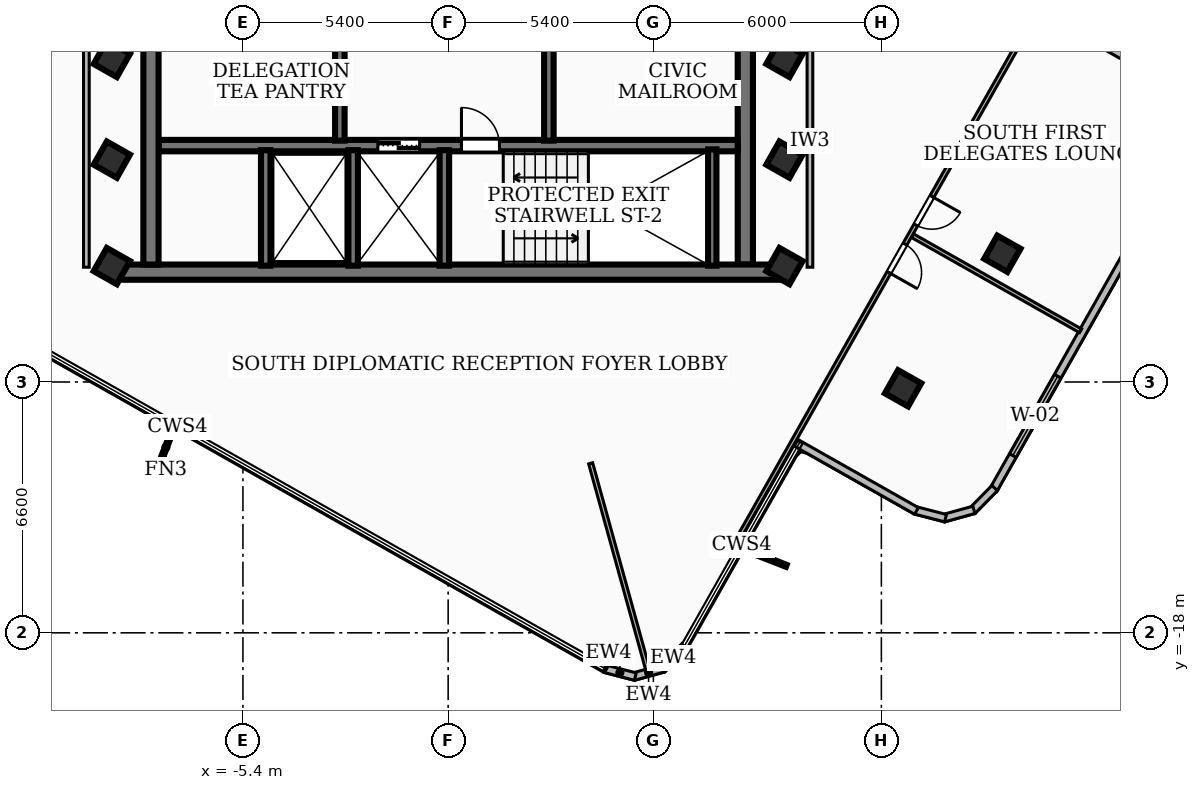
"""IFC4 building model, lengths in metres.
Left out: names, types, materials, properties, quantities, classifications, styles, units other than length and angle.
Written with IfcOpenShell. Run it as: python <this file> out.ifc"""

import sys

from ifc_helpers import new_model, si_unit, direction, frame, frame_2d, origin, origin_2d, place, context, subcontext, project, spatial, rectangle, extrude, element, fill, save


model = new_model("IFC4")
c1 = context("Model", 3, precision=1e-05, world=origin(), true_north=direction((0.0, 1.0)))
c2 = subcontext(c1, "Body", "Model", "MODEL_VIEW")
j1 = project(units=[si_unit("LENGTHUNIT", "METRE"), si_unit("PLANEANGLEUNIT", "RADIAN")], contexts=[c1])
p1 = place(None, origin())
s1 = spatial("IfcSite", under=j1, at=p1, CompositionType="ELEMENT")
p2 = place(p1, origin())
s2 = spatial("IfcBuilding", under=s1, at=p2, CompositionType="ELEMENT")
p3 = place(p2, frame((0.0, 0.0, 278.28)))
s3 = spatial("IfcBuildingStorey", under=s2, at=p3, CompositionType="ELEMENT", Elevation=278.28)
p4 = place(p3, frame((8.78, -8.51, 0.0), z_axis=(0.0, 0.0, 1.0), x_axis=(-1.0, 0.0, 0.0)))
e1 = element("IfcWall", 1, at=p4, inside=s3, PredefinedType="SHEAR", context=c2, shape_type="SweptSolid", body=[
    extrude(rectangle(XDim=17.56, YDim=0.4, at=frame_2d((8.78, 0.0))), origin(), (0.0, 0.0, 1.0), 3.16),
])
for number, where, z_axis, x_axis in (
    (2, (-7.82, -8.31, 0.0), (0.0, 0.0, 1.0), (0.0, 1.0, 0.0)),
    (3, (7.82, -1.95, 0.0), (0.0, 0.0, 1.0), (0.0, -1.0, 0.0)),
):
    element("IfcWall", number, at=place(p3, frame(where, z_axis=z_axis, x_axis=x_axis)), inside=s3, PredefinedType="SHEAR", context=c2, shape_type="SweptSolid", body=[
        extrude(rectangle(XDim=6.36, YDim=0.4, at=frame_2d((3.18, 0.0))), origin(), (0.0, 0.0, 1.0), 3.16),
    ])
p5 = place(p3, frame((-7.62, -5.18, 0.0), z_axis=(0.0, 0.0, 1.0), x_axis=(1.0, 0.0, 0.0)))
e4 = element("IfcWall", 4, at=p5, inside=s3, PredefinedType="SOLIDWALL", context=c2, shape_type="SweptSolid", body=[
    extrude(rectangle(XDim=15.24, YDim=0.3, at=frame_2d((7.62, 0.0))), origin(), (0.0, 0.0, 1.0), 3.16),
])
p6 = place(p5, frame((5.77, 0.0, 0.0)))
e5 = element("IfcOpeningElement", 5, at=p6, cuts=e4, PredefinedType="OPENING", context=c2, shape_type="SweptSolid", body=[
    extrude(rectangle(XDim=1.1, YDim=2.15, at=frame_2d((0.55, 1.075))), frame((0.0, 0.16, 0.0), z_axis=(0.0, -1.0, 0.0), x_axis=(1.0, 0.0, 0.0)), (0.0, 0.0, 1.0), 0.32),
])
p7 = place(p5, frame((7.97, 0.0, 0.0)))
e6 = element("IfcOpeningElement", 6, at=p7, cuts=e4, PredefinedType="OPENING", context=c2, shape_type="SweptSolid", body=[
    extrude(rectangle(XDim=1.0, YDim=2.1, at=frame_2d((0.5, 1.05))), frame((0.0, 0.16, 0.0), z_axis=(0.0, -1.0, 0.0), x_axis=(1.0, 0.0, 0.0)), (0.0, 0.0, 1.0), 0.32),
])
p8 = place(p3, frame((6.95, -8.34, 0.0), z_axis=(0.0, 0.0, 1.0), x_axis=(0.0, 1.0, 0.0)))
e7 = element("IfcWall", 7, at=p8, inside=s3, PredefinedType="SOLIDWALL", context=c2, shape_type="SweptSolid", body=[
    extrude(rectangle(XDim=3.06, YDim=0.22, at=frame_2d((1.53, 0.0))), origin(), (0.0, 0.0, 1.0), 3.16),
])
for number, where, z_axis, x_axis in (
    (8, (-0.1, -8.34, 0.0), (0.0, 0.0, 1.0), (0.0, 1.0, 0.0)),
    (9, (-2.5, -8.34, 0.0), (0.0, 0.0, 1.0), (0.0, 1.0, 0.0)),
    (10, (-4.8, -8.34, 0.0), (0.0, 0.0, 1.0), (0.0, 1.0, 0.0)),
):
    element("IfcWall", number, at=place(p3, frame(where, z_axis=z_axis, x_axis=x_axis)), inside=s3, PredefinedType="SOLIDWALL", context=c2, shape_type="SweptSolid", body=[
        extrude(rectangle(XDim=3.04, YDim=0.25, at=frame_2d((1.52, 0.0))), origin(), (0.0, 0.0, 1.0), 3.16),
    ])
for number, where, z_axis, x_axis in (
    (11, (-2.85, -5.05, 0.0), (0.0, 0.0, 1.0), (0.0, 1.0, 0.0)),
    (12, (2.65, -5.05, 0.0), (0.0, 0.0, 1.0), (0.0, 1.0, 0.0)),
):
    element("IfcWall", number, at=place(p3, frame(where, z_axis=z_axis, x_axis=x_axis)), inside=s3, PredefinedType="SOLIDWALL", context=c2, shape_type="SweptSolid", body=[
        extrude(rectangle(XDim=3.07, YDim=0.25, at=frame_2d((1.535, 0.0))), origin(), (0.0, 0.0, 1.0), 3.16),
    ])
for number, where, z_axis, x_axis in (
    (13, (-8.85, -5.55, 0.0), (0.0, 0.0, 1.0), (0.493, 0.87, 0.0)),
    (14, (-8.85, -2.9, 0.0), (0.0, 0.0, 1.0), (0.493, 0.87, 0.0)),
    (15, (8.85, -5.55, 0.0), (0.0, 0.0, 1.0), (0.493, 0.87, 0.0)),
    (16, (8.85, -2.9, 0.0), (0.0, 0.0, 1.0), (0.493, 0.87, 0.0)),
    (17, (8.85, -8.35, 0.0), (0.0, 0.0, 1.0), (0.493, 0.87, 0.0)),
    (18, (-8.85, -8.35, 0.0), (0.0, 0.0, 1.0), (0.493, 0.87, 0.0)),
    (19, (11.971, -11.566, 0.0), (0.0, 0.0, 1.0), (0.493, 0.87, 0.0)),
    (20, (14.583, -8.026, 0.0), (0.0, 0.0, 1.0), (0.493, 0.87, 0.0)),
):
    element("IfcColumn", number, at=place(p3, frame(where, z_axis=z_axis, x_axis=x_axis)), inside=s3, PredefinedType="COLUMN", context=c2, shape_type="SweptSolid", body=[
        extrude(rectangle(XDim=0.7, YDim=0.7, at=origin_2d()), origin(), (0.0, 0.0, 1.0), 3.42),
    ])
p9 = place(p3, frame((6.218, -18.359, 0.0), z_axis=(0.0, 0.0, 1.0), x_axis=(-0.701706468749, -0.712466161804, 0.0)))
e21 = element("IfcWall", 21, at=p9, inside=s3, PredefinedType="SOLIDWALL", context=c2, shape_type="SweptSolid", body=[
    extrude(rectangle(XDim=0.84, YDim=0.2, at=frame_2d((0.42, 0.0))), origin(), (0.0, 0.0, 1.0), 3.16),
])
p10 = place(p3, frame((5.671, -18.932, 0.0), z_axis=(0.0, 0.0, 1.0), x_axis=(-0.963313924885, -0.268377126675, 0.0)))
e22 = element("IfcWall", 22, at=p10, inside=s3, PredefinedType="SOLIDWALL", context=c2, shape_type="SweptSolid", body=[
    extrude(rectangle(XDim=0.824, YDim=0.2, at=frame_2d((0.412, 0.0))), origin(), (0.0, 0.0, 1.0), 3.16),
])
p11 = place(p3, frame((4.925, -19.152, 0.0), z_axis=(0.0, 0.0, 1.0), x_axis=(-0.968015248239, 0.250891369276, 0.0)))
e23 = element("IfcWall", 23, at=p11, inside=s3, PredefinedType="SOLIDWALL", context=c2, shape_type="SweptSolid", body=[
    extrude(rectangle(XDim=0.838, YDim=0.2, at=frame_2d((0.419, 0.0))), origin(), (0.0, 0.0, 1.0), 3.16),
])
p12 = place(p3, frame((15.609, -1.599, 0.0), z_axis=(0.0, 0.0, 1.0), x_axis=(0.87036421417, -0.49240850388, 0.0)))
e24 = element("IfcWall", 24, at=p12, inside=s3, PredefinedType="SOLIDWALL", context=c2, shape_type="SweptSolid", body=[
    extrude(rectangle(XDim=3.641, YDim=0.2, at=frame_2d((1.821, 0.0))), origin(), (0.0, 0.0, 1.0), 3.16),
])
p13 = place(p3, frame((19.339, -5.421, 0.0), z_axis=(0.0, 0.0, 1.0), x_axis=(-0.492615794655, -0.870246906835, 0.0)))
e25 = element("IfcWall", 25, at=p13, inside=s3, PredefinedType="SOLIDWALL", context=c2, shape_type="SweptSolid", body=[
    extrude(rectangle(XDim=10.124, YDim=0.2, at=frame_2d((5.062, 0.0))), origin(), (0.0, 0.0, 1.0), 3.16),
])
p14 = place(p13, frame((6.696, 0.0, 0.85)))
e26 = element("IfcOpeningElement", 26, at=p14, cuts=e25, PredefinedType="OPENING", context=c2, shape_type="SweptSolid", body=[
    extrude(rectangle(XDim=2.4, YDim=2.1, at=frame_2d((1.2, 1.05))), frame((0.0, 0.11, 0.0), z_axis=(0.0, -1.0, 0.0), x_axis=(1.0, 0.0, 0.0)), (0.0, 0.0, 1.0), 0.22),
])
p15 = place(p3, frame((14.382, -14.191, 0.0), z_axis=(0.0, 0.0, 1.0), x_axis=(-0.701706468749, -0.712466161804, 0.0)))
e27 = element("IfcWall", 27, at=p15, inside=s3, PredefinedType="SOLIDWALL", context=c2, shape_type="SweptSolid", body=[
    extrude(rectangle(XDim=0.84, YDim=0.2, at=frame_2d((0.42, 0.0))), origin(), (0.0, 0.0, 1.0), 3.16),
])
p16 = place(p3, frame((13.835, -14.764, 0.0), z_axis=(0.0, 0.0, 1.0), x_axis=(-0.963780368541, -0.266697208862, 0.0)))
e28 = element("IfcWall", 28, at=p16, inside=s3, PredefinedType="SOLIDWALL", context=c2, shape_type="SweptSolid", body=[
    extrude(rectangle(XDim=0.825, YDim=0.2, at=frame_2d((0.412, 0.0))), origin(), (0.0, 0.0, 1.0), 3.16),
])
p17 = place(p3, frame((13.088, -14.983, 0.0), z_axis=(0.0, 0.0, 1.0), x_axis=(-0.968350107443, 0.249595812096, 0.0)))
e29 = element("IfcWall", 29, at=p17, inside=s3, PredefinedType="SOLIDWALL", context=c2, shape_type="SweptSolid", body=[
    extrude(rectangle(XDim=0.837, YDim=0.2, at=frame_2d((0.419, 0.0))), origin(), (0.0, 0.0, 1.0), 3.16),
])
p18 = place(p3, frame((12.323, -14.792, 0.0), z_axis=(0.0, 0.0, 1.0), x_axis=(-0.870412972764, 0.492322309918, 0.0)))
e30 = element("IfcWall", 30, at=p18, inside=s3, PredefinedType="SOLIDWALL", context=c2, shape_type="SweptSolid", body=[
    extrude(rectangle(XDim=3.642, YDim=0.2, at=frame_2d((1.821, 0.0))), origin(), (0.0, 0.0, 1.0), 3.16),
])
p19 = place(p3, frame((-9.52, -8.38, 0.0), z_axis=(0.0, 0.0, 1.0), x_axis=(0.0, 1.0, 0.0)))
e31 = element("IfcWall", 31, at=p19, inside=s3, PredefinedType="PARTITIONING", context=c2, shape_type="SweptSolid", body=[
    extrude(rectangle(XDim=6.63, YDim=0.15, at=frame_2d((3.315, 0.0))), origin(), (0.0, 0.0, 1.0), 3.16),
])
p20 = place(p3, frame((9.52, -8.38, 0.0), z_axis=(0.0, 0.0, 1.0), x_axis=(0.0, 1.0, 0.0)))
e32 = element("IfcWall", 32, at=p20, inside=s3, PredefinedType="PARTITIONING", context=c2, shape_type="SweptSolid", body=[
    extrude(rectangle(XDim=6.63, YDim=0.15, at=frame_2d((3.315, 0.0))), origin(), (0.0, 0.0, 1.0), 2.53),
])
p21 = place(p3, frame((3.75, -13.54, 0.0), z_axis=(0.0, 0.0, 1.0), x_axis=(0.266822842302, -0.963745594452, 0.0)))
e33 = element("IfcWall", 33, at=p21, inside=s3, PredefinedType="PARTITIONING", context=c2, shape_type="SweptSolid", body=[
    extrude(rectangle(XDim=5.645, YDim=0.11, at=frame_2d((2.822, 0.0))), origin(), (0.0, 0.0, 1.0), 3.16),
])
p22 = place(p3, frame((12.216, -7.549, 0.0), z_axis=(0.0, 0.0, 1.0), x_axis=(0.870245204201, -0.492618802488, 0.0)))
e34 = element("IfcWall", 34, at=p22, inside=s3, PredefinedType="PARTITIONING", context=c2, shape_type="SweptSolid", body=[
    extrude(rectangle(XDim=5.085, YDim=0.11, at=frame_2d((2.542, 0.0))), origin(), (0.0, 0.0, 1.0), 2.53),
])
p23 = place(p3, frame((17.619, 2.113, 0.0), z_axis=(0.0, 0.0, 1.0), x_axis=(-0.492746831558, -0.870172718482, 0.0)))
e35 = element("IfcWall", 35, at=p23, inside=s3, PredefinedType="PARTITIONING", context=c2, shape_type="SweptSolid", body=[
    extrude(rectangle(XDim=20.54, YDim=0.11, at=frame_2d((10.27, 0.0))), origin(), (0.0, 0.0, 1.0), 2.53),
])
p24 = place(p23, frame((11.36, 0.0, 0.0)))
e36 = element("IfcOpeningElement", 36, at=p24, cuts=e35, PredefinedType="OPENING", context=c2, shape_type="SweptSolid", body=[
    extrude(rectangle(XDim=0.86, YDim=2.04, at=frame_2d((0.43, 1.02))), frame((0.0, 0.065, 0.0), z_axis=(0.0, -1.0, 0.0), x_axis=(1.0, 0.0, 0.0)), (0.0, 0.0, 1.0), 0.13),
])
p25 = place(p23, frame((9.92, 0.0, 0.0)))
e37 = element("IfcOpeningElement", 37, at=p25, cuts=e35, PredefinedType="OPENING", context=c2, shape_type="SweptSolid", body=[
    extrude(rectangle(XDim=0.86, YDim=2.04, at=frame_2d((0.43, 1.02))), frame((0.0, 0.065, 0.0), z_axis=(0.0, -1.0, 0.0), x_axis=(1.0, 0.0, 0.0)), (0.0, 0.0, 1.0), 0.13),
])
p26 = place(p14, origin())
e38 = element("IfcWindow", 38, at=p26, inside=s3, PartitioningType="SINGLE_PANEL", PredefinedType="WINDOW", context=c2, shape_type="SweptSolid", body=[
    extrude(rectangle(XDim=2.4, YDim=2.1, at=frame_2d((1.2, 1.05))), frame((0.0, 0.03, 0.0), z_axis=(0.0, -1.0, 0.0), x_axis=(1.0, 0.0, 0.0)), (0.0, 0.0, 1.0), 0.06),
])
fill(e26, e38)
p27 = place(p6, origin())
e39 = element("IfcDoor", 39, at=p27, inside=s3, OperationType="DOUBLE_DOOR_SLIDING", PredefinedType="DOOR", context=c2, shape_type="SweptSolid", body=[
    extrude(rectangle(XDim=1.1, YDim=2.15, at=frame_2d((0.55, 1.075))), frame((0.0, 0.025, 0.0), z_axis=(0.0, -1.0, 0.0), x_axis=(1.0, 0.0, 0.0)), (0.0, 0.0, 1.0), 0.05),
])
fill(e5, e39)
p28 = place(p7, origin())
e40 = element("IfcDoor", 40, at=p28, inside=s3, OperationType="SINGLE_SWING_LEFT", PredefinedType="DOOR", context=c2, shape_type="SweptSolid", body=[
    extrude(rectangle(XDim=1.0, YDim=2.1, at=frame_2d((0.5, 1.05))), frame((0.0, 0.025, 0.0), z_axis=(0.0, -1.0, 0.0), x_axis=(1.0, 0.0, 0.0)), (0.0, 0.0, 1.0), 0.05),
])
fill(e6, e40)
p29 = place(p24, origin())
e41 = element("IfcDoor", 41, at=p29, inside=s3, OperationType="SINGLE_SWING_RIGHT", PredefinedType="DOOR", context=c2, shape_type="SweptSolid", body=[
    extrude(rectangle(XDim=0.86, YDim=2.04, at=frame_2d((0.43, 1.02))), frame((0.0, 0.025, 0.0), z_axis=(0.0, -1.0, 0.0), x_axis=(1.0, 0.0, 0.0)), (0.0, 0.0, 1.0), 0.05),
])
fill(e36, e41)
p30 = place(p25, origin())
e42 = element("IfcDoor", 42, at=p30, inside=s3, OperationType="SINGLE_SWING_LEFT", PredefinedType="DOOR", context=c2, shape_type="SweptSolid", body=[
    extrude(rectangle(XDim=0.86, YDim=2.04, at=frame_2d((0.43, 1.02))), frame((0.0, 0.025, 0.0), z_axis=(0.0, -1.0, 0.0), x_axis=(1.0, 0.0, 0.0)), (0.0, 0.0, 1.0), 0.05),
])
fill(e37, e42)
save(model, sys.argv[1])
